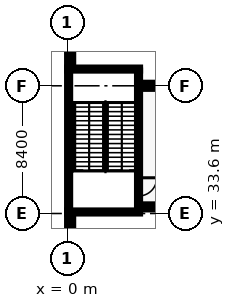
"""IFC4 building model, lengths in metres.
Left out: names, types, materials, properties, quantities, classifications, styles, units other than length and angle.
Written with IfcOpenShell. Run it as: python <this file> out.ifc"""

import sys

from ifc_helpers import new_model, si_unit, direction, frame, frame_2d, origin, origin_2d, place, context, subcontext, project, spatial, rectangle, extrude, element, fill, save


model = new_model("IFC4")
c1 = context("Model", 3, precision=1e-05, world=origin(), true_north=direction((0.0, 1.0)))
c2 = subcontext(c1, "Body", "Model", "MODEL_VIEW")
j1 = project(units=[si_unit("LENGTHUNIT", "METRE"), si_unit("PLANEANGLEUNIT", "RADIAN")], contexts=[c1])
p1 = place(None, origin())
s1 = spatial("IfcSite", under=j1, at=p1, CompositionType="ELEMENT")
p2 = place(p1, origin())
s2 = spatial("IfcBuilding", under=s1, at=p2, CompositionType="ELEMENT")
p3 = place(p2, frame((0.0, 0.0, 10.2)))
s3 = spatial("IfcBuildingStorey", under=s2, at=p3, CompositionType="ELEMENT", Elevation=10.2)
for number, where, z_axis, x_axis in (
    (1, (4.8, 33.7, 0.0), (0.0, 0.0, 1.0), (-1.0, 0.0, 0.0)),
    (2, (0.0, 43.1, 0.0), (0.0, 0.0, 1.0), (1.0, 0.0, 0.0)),
):
    element("IfcWall", number, at=place(p3, frame(where, z_axis=z_axis, x_axis=x_axis)), inside=s3, PredefinedType="SHEAR", context=c2, shape_type="SweptSolid", body=[
        extrude(rectangle(XDim=4.8, YDim=0.2, at=frame_2d((2.4, 0.0))), origin(), (0.0, 0.0, 1.0), 4.8),
    ])
p4 = place(p3, frame((0.1, 33.8, 0.0), z_axis=(0.0, 0.0, 1.0), x_axis=(0.0, 1.0, 0.0)))
e3 = element("IfcWall", 3, at=p4, inside=s3, PredefinedType="SHEAR", context=c2, shape_type="SweptSolid", body=[
    extrude(rectangle(XDim=9.2, YDim=0.2, at=frame_2d((4.6, 0.0))), origin(), (0.0, 0.0, 1.0), 4.8),
])
p5 = place(p3, frame((4.7, 43.0, 0.0), z_axis=(0.0, 0.0, 1.0), x_axis=(0.0, -1.0, 0.0)))
e4 = element("IfcWall", 4, at=p5, inside=s3, PredefinedType="SHEAR", context=c2, shape_type="SweptSolid", body=[
    extrude(rectangle(XDim=9.2, YDim=0.2, at=frame_2d((4.6, 0.0))), origin(), (0.0, 0.0, 1.0), 4.8),
])
p6 = place(p5, frame((7.05, 0.0, 0.0)))
e5 = element("IfcOpeningElement", 5, at=p6, cuts=e4, PredefinedType="OPENING", context=c2, shape_type="SweptSolid", body=[
    extrude(rectangle(XDim=1.2, YDim=2.1, at=frame_2d((0.6, 1.05))), frame((0.0, 0.11, 0.0), z_axis=(0.0, -1.0, 0.0), x_axis=(1.0, 0.0, 0.0)), (0.0, 0.0, 1.0), 0.22),
])
p7 = place(p3, frame((17.0, 42.0, 0.0), z_axis=(0.0, 0.0, 1.0), x_axis=(-1.0, 0.0, 0.0)))
e6 = element("IfcWall", 6, at=p7, inside=s3, PredefinedType="SHEAR", context=c2, shape_type="SweptSolid", body=[
    extrude(rectangle(XDim=12.2, YDim=0.4, at=frame_2d((6.1, 0.0))), origin(), (0.0, 0.0, 1.0), 4.8),
])
p8 = place(p7, frame((6.85, 0.0, 0.0)))
e7 = element("IfcOpeningElement", 7, at=p8, cuts=e6, PredefinedType="OPENING", context=c2, shape_type="SweptSolid", body=[
    extrude(rectangle(XDim=1.8, YDim=2.1, at=frame_2d((0.9, 1.05))), frame((0.0, 0.21, 0.0), z_axis=(0.0, -1.0, 0.0), x_axis=(1.0, 0.0, 0.0)), (0.0, 0.0, 1.0), 0.42),
])
p9 = place(p7, frame((1.4, 0.0, 0.0)))
e8 = element("IfcOpeningElement", 8, at=p9, cuts=e6, PredefinedType="OPENING", context=c2, shape_type="SweptSolid", body=[
    extrude(rectangle(XDim=1.8, YDim=2.1, at=frame_2d((0.9, 1.05))), frame((0.0, 0.21, 0.0), z_axis=(0.0, -1.0, 0.0), x_axis=(1.0, 0.0, 0.0)), (0.0, 0.0, 1.0), 0.42),
])
p10 = place(p3, frame((0.2, 43.2, 0.0), z_axis=(0.0, 0.0, 1.0), x_axis=(0.0, 1.0, 0.0)))
e9 = element("IfcWall", 9, at=p10, inside=s3, PredefinedType="SHEAR", context=c2, shape_type="SweptSolid", body=[
    extrude(rectangle(XDim=14.4, YDim=0.4, at=frame_2d((7.2, 0.0))), origin(), (0.0, 0.0, 1.0), 4.8),
])
p11 = place(p3, frame((6.776, 34.05, 0.0), z_axis=(0.0, 0.0, 1.0), x_axis=(-1.0, 0.0, 0.0)))
e10 = element("IfcWall", 10, at=p11, inside=s3, PredefinedType="SOLIDWALL", context=c2, shape_type="SweptSolid", body=[
    extrude(rectangle(XDim=1.976, YDim=0.3, at=frame_2d((0.988, 0.0))), origin(), (0.0, 0.0, 1.0), 4.5),
])
p12 = place(p3, frame((0.2, 33.0, 0.0), z_axis=(0.0, 0.0, 1.0), x_axis=(1.0, 0.0, 0.0)))
e11 = element("IfcColumn", 11, at=p12, inside=s3, PredefinedType="PILASTER", context=c2, shape_type="SweptSolid", body=[
    extrude(rectangle(XDim=0.4, YDim=1.2, at=origin_2d()), origin(), (0.0, 0.0, 1.0), 4.8),
])
p13 = place(p6, origin())
e12 = element("IfcDoor", 12, at=p13, inside=s3, OperationType="SINGLE_SWING_LEFT", PredefinedType="DOOR", context=c2, shape_type="SweptSolid", body=[
    extrude(rectangle(XDim=1.2, YDim=2.1, at=frame_2d((0.6, 1.05))), frame((0.0, 0.025, 0.0), z_axis=(0.0, -1.0, 0.0), x_axis=(1.0, 0.0, 0.0)), (0.0, 0.0, 1.0), 0.05),
])
fill(e5, e12)
save(model, sys.argv[1])
